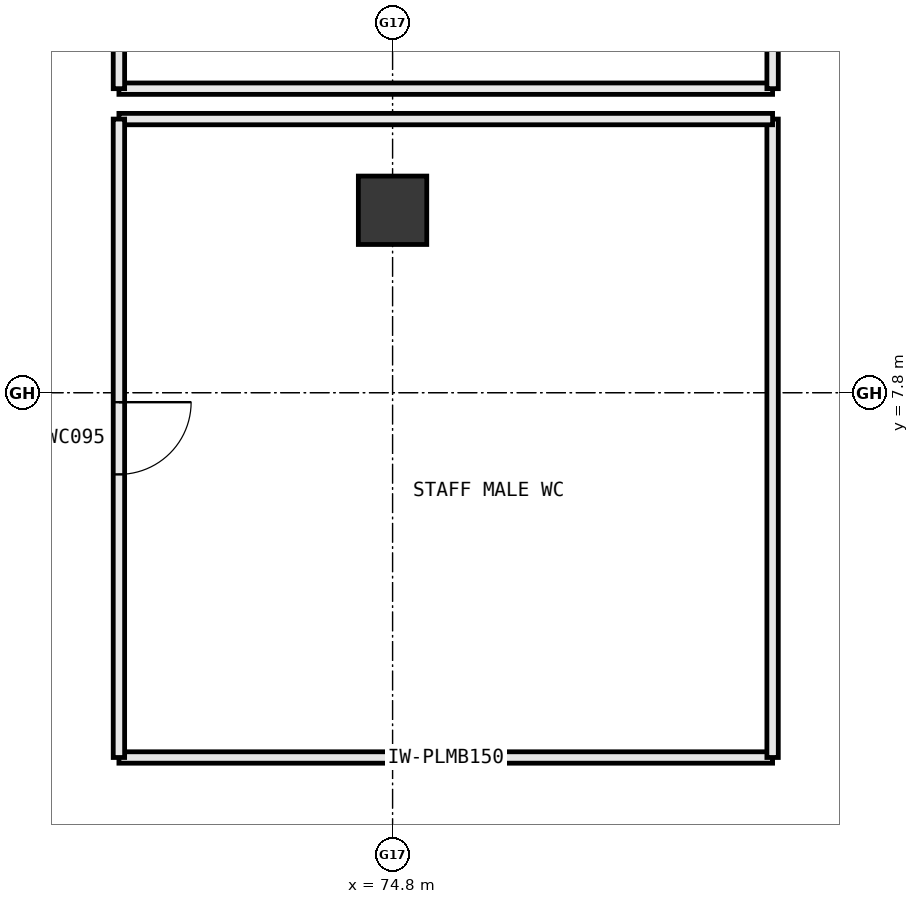
"""IFC4 building model, lengths in metres.
Left out: names, types, materials, properties, quantities, classifications, styles, units other than length and angle.
Written with IfcOpenShell. Run it as: python <this file> out.ifc"""

import sys

from ifc_helpers import new_model, si_unit, direction, frame, frame_2d, origin, origin_2d, place, context, subcontext, project, spatial, rectangle, extrude, element, fill, save


model = new_model("IFC4")
c1 = context("Model", 3, precision=1e-05, world=origin(), true_north=direction((0.0, 1.0)))
c2 = subcontext(c1, "Body", "Model", "MODEL_VIEW")
j1 = project(units=[si_unit("LENGTHUNIT", "METRE"), si_unit("PLANEANGLEUNIT", "RADIAN")], contexts=[c1])
p1 = place(None, origin())
s1 = spatial("IfcSite", under=j1, at=p1, CompositionType="ELEMENT")
p2 = place(p1, origin())
s2 = spatial("IfcBuilding", under=s1, at=p2, CompositionType="ELEMENT")
p3 = place(p2, frame((0.0, 0.0, -4.5)))
s3 = spatial("IfcBuildingStorey", under=s2, at=p3, CompositionType="ELEMENT", Elevation=-4.5)
p4 = place(p3, frame((74.8, 10.2, 0.0), z_axis=(0.0, 0.0, 1.0), x_axis=(1.0, 0.0, 0.0)))
e1 = element("IfcColumn", 1, at=p4, inside=s3, PredefinedType="COLUMN", context=c2, shape_type="SweptSolid", body=[
    extrude(rectangle(XDim=0.9, YDim=0.9, at=origin_2d()), origin(), (0.0, 0.0, 1.0), 4.5),
])
p5 = place(p3, frame((71.2, 3.0, 0.0), z_axis=(0.0, 0.0, 1.0), x_axis=(1.0, 0.0, 0.0)))
e2 = element("IfcWall", 2, at=p5, inside=s3, PredefinedType="PLUMBINGWALL", context=c2, shape_type="SweptSolid", body=[
    extrude(rectangle(XDim=8.6, YDim=0.15, at=frame_2d((4.3, 0.0))), origin(), (0.0, 0.0, 1.0), 4.2),
])
p6 = place(p3, frame((79.8, 3.0, 0.0), z_axis=(0.0, 0.0, 1.0), x_axis=(0.0, 1.0, 0.0)))
e3 = element("IfcWall", 3, at=p6, inside=s3, PredefinedType="PLUMBINGWALL", context=c2, shape_type="SweptSolid", body=[
    extrude(rectangle(XDim=8.4, YDim=0.15, at=frame_2d((4.2, 0.0))), origin(), (0.0, 0.0, 1.0), 4.2),
])
p7 = place(p3, frame((79.8, 11.4, 0.0), z_axis=(0.0, 0.0, 1.0), x_axis=(-1.0, 0.0, 0.0)))
e4 = element("IfcWall", 4, at=p7, inside=s3, PredefinedType="PLUMBINGWALL", context=c2, shape_type="SweptSolid", body=[
    extrude(rectangle(XDim=8.6, YDim=0.15, at=frame_2d((4.3, 0.0))), origin(), (0.0, 0.0, 1.0), 4.2),
])
p8 = place(p3, frame((71.2, 11.4, 0.0), z_axis=(0.0, 0.0, 1.0), x_axis=(0.0, -1.0, 0.0)))
e5 = element("IfcWall", 5, at=p8, inside=s3, PredefinedType="PLUMBINGWALL", context=c2, shape_type="SweptSolid", body=[
    extrude(rectangle(XDim=8.4, YDim=0.15, at=frame_2d((4.2, 0.0))), origin(), (0.0, 0.0, 1.0), 4.2),
])
p9 = place(p8, frame((3.725, 0.0, 0.0)))
e6 = element("IfcOpeningElement", 6, at=p9, cuts=e5, PredefinedType="OPENING", context=c2, shape_type="SweptSolid", body=[
    extrude(rectangle(XDim=0.95, YDim=2.15, at=frame_2d((0.475, 1.075))), frame((0.0, 0.087, 0.0), z_axis=(0.0, -1.0, 0.0), x_axis=(1.0, 0.0, 0.0)), (0.0, 0.0, 1.0), 0.174),
])
p10 = place(p3, frame((71.2, 11.8, 0.0), z_axis=(0.0, 0.0, 1.0), x_axis=(1.0, 0.0, 0.0)))
e7 = element("IfcWall", 7, at=p10, inside=s3, PredefinedType="PLUMBINGWALL", context=c2, shape_type="SweptSolid", body=[
    extrude(rectangle(XDim=8.6, YDim=0.15, at=frame_2d((4.3, 0.0))), origin(), (0.0, 0.0, 1.0), 4.2),
])
p11 = place(p3, frame((79.8, 11.8, 0.0), z_axis=(0.0, 0.0, 1.0), x_axis=(0.0, 1.0, 0.0)))
e8 = element("IfcWall", 8, at=p11, inside=s3, PredefinedType="PLUMBINGWALL", context=c2, shape_type="SweptSolid", body=[
    extrude(rectangle(XDim=7.8, YDim=0.15, at=frame_2d((3.9, 0.0))), origin(), (0.0, 0.0, 1.0), 4.2),
])
p12 = place(p3, frame((71.2, 19.6, 0.0), z_axis=(0.0, 0.0, 1.0), x_axis=(0.0, -1.0, 0.0)))
e9 = element("IfcWall", 9, at=p12, inside=s3, PredefinedType="PLUMBINGWALL", context=c2, shape_type="SweptSolid", body=[
    extrude(rectangle(XDim=7.8, YDim=0.15, at=frame_2d((3.9, 0.0))), origin(), (0.0, 0.0, 1.0), 4.2),
])
p13 = place(p12, frame((3.425, 0.0, 0.0)))
e10 = element("IfcOpeningElement", 10, at=p13, cuts=e9, PredefinedType="OPENING", context=c2, shape_type="SweptSolid", body=[
    extrude(rectangle(XDim=0.95, YDim=2.15, at=frame_2d((0.475, 1.075))), frame((0.0, 0.087, 0.0), z_axis=(0.0, -1.0, 0.0), x_axis=(1.0, 0.0, 0.0)), (0.0, 0.0, 1.0), 0.174),
])
p14 = place(p9, origin())
e11 = element("IfcDoor", 11, at=p14, inside=s3, OperationType="SINGLE_SWING_LEFT", PredefinedType="DOOR", context=c2, shape_type="SweptSolid", body=[
    extrude(rectangle(XDim=0.95, YDim=2.15, at=frame_2d((0.475, 1.075))), frame((0.0, 0.025, 0.0), z_axis=(0.0, -1.0, 0.0), x_axis=(1.0, 0.0, 0.0)), (0.0, 0.0, 1.0), 0.05),
])
fill(e6, e11)
save(model, sys.argv[1])
